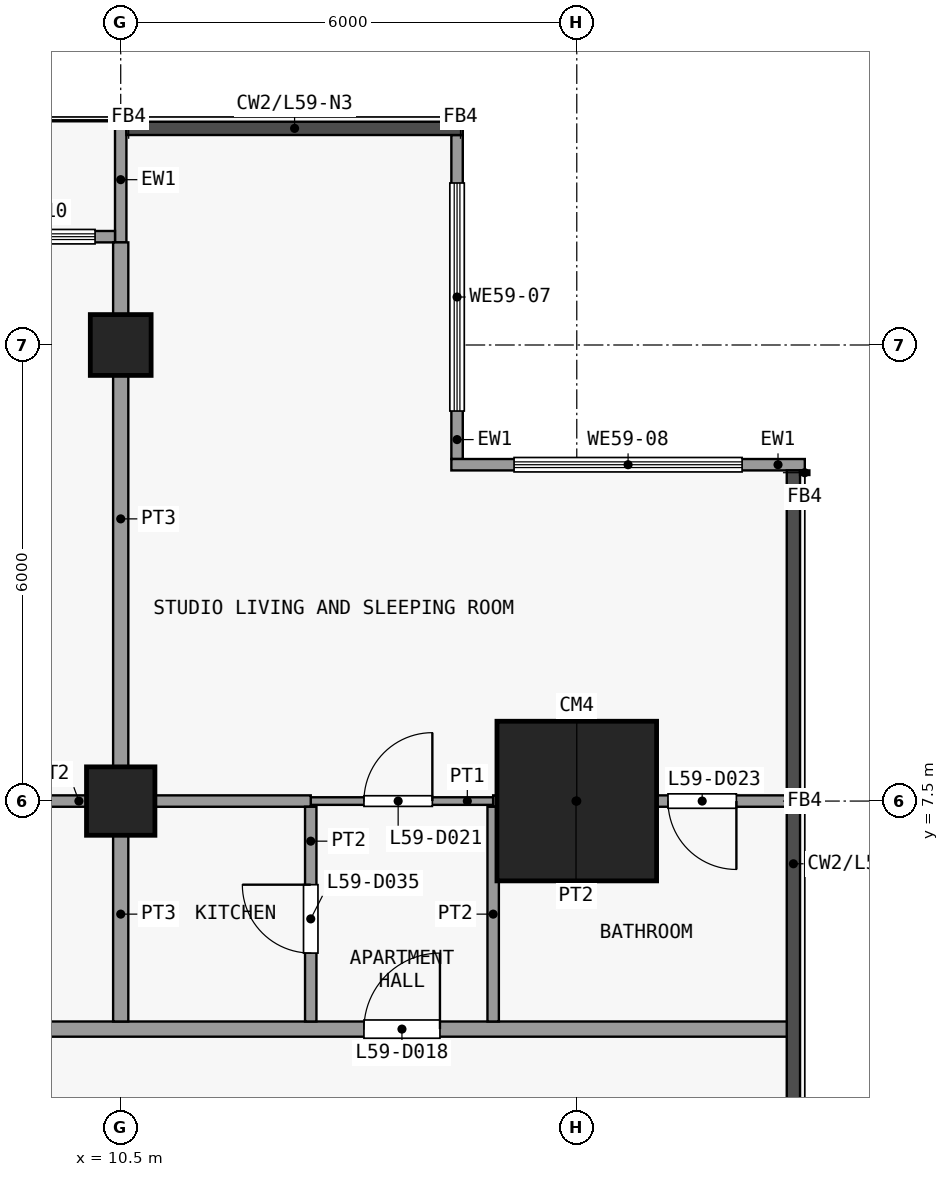
"""IFC4 building model, lengths in metres.
Left out: names, types, materials, properties, quantities, classifications, styles, units other than length and angle.
Written with IfcOpenShell. Run it as: python <this file> out.ifc"""

import sys

from ifc_helpers import new_model, si_unit, direction, frame, frame_2d, origin, origin_2d, place, context, subcontext, project, spatial, rectangle, extrude, element, fill, save


model = new_model("IFC4")
c1 = context("Model", 3, precision=1e-05, world=origin(), true_north=direction((0.0, 1.0)))
c2 = subcontext(c1, "Body", "Model", "MODEL_VIEW")
j1 = project(units=[si_unit("LENGTHUNIT", "METRE"), si_unit("PLANEANGLEUNIT", "RADIAN")], contexts=[c1])
p1 = place(None, origin())
s1 = spatial("IfcSite", under=j1, at=p1, CompositionType="ELEMENT")
p2 = place(p1, origin())
s2 = spatial("IfcBuilding", under=s1, at=p2, CompositionType="ELEMENT")
p3 = place(p2, frame((0.0, 0.0, 233.9)))
s3 = spatial("IfcBuildingStorey", under=s2, at=p3, CompositionType="ELEMENT", Elevation=233.9)
p4 = place(p3, frame((10.5, 7.5, 0.0), z_axis=(0.0, 0.0, 1.0), x_axis=(1.0, 0.0, 0.0)))
e1 = element("IfcColumn", 1, at=p4, inside=s3, PredefinedType="COLUMN", context=c2, shape_type="SweptSolid", body=[
    extrude(rectangle(XDim=0.9, YDim=0.9, at=origin_2d()), origin(), (0.0, 0.0, 1.0), 3.6),
])
p5 = place(p3, frame((10.5, 13.5, 0.0), z_axis=(0.0, 0.0, 1.0), x_axis=(1.0, 0.0, 0.0)))
e2 = element("IfcColumn", 2, at=p5, inside=s3, PredefinedType="COLUMN", context=c2, shape_type="SweptSolid", body=[
    extrude(rectangle(XDim=0.8, YDim=0.8, at=origin_2d()), origin(), (0.0, 0.0, 1.0), 3.6),
])
p6 = place(p3, frame((16.5, 7.5, 0.0), z_axis=(0.0, 0.0, 1.0), x_axis=(1.0, 0.0, 0.0)))
e3 = element("IfcColumn", 3, at=p6, inside=s3, PredefinedType="COLUMN", context=c2, shape_type="SweptSolid", body=[
    extrude(rectangle(XDim=2.1, YDim=2.1, at=origin_2d()), origin(), (0.0, 0.0, 1.0), 3.6),
])
p7 = place(p3, frame((14.925, 16.262, 0.0), z_axis=(0.0, 0.0, 1.0), x_axis=(0.0, -1.0, 0.0)))
e4 = element("IfcWall", 4, at=p7, inside=s3, PredefinedType="SOLIDWALL", context=c2, shape_type="SweptSolid", body=[
    extrude(rectangle(XDim=4.262, YDim=0.15, at=frame_2d((2.131, 0.0))), origin(), (0.0, 0.0, 1.0), 3.3),
])
p8 = place(p7, frame((0.631, 0.0, 0.9)))
e5 = element("IfcOpeningElement", 5, at=p8, cuts=e4, PredefinedType="OPENING", context=c2, shape_type="SweptSolid", body=[
    extrude(rectangle(XDim=3.0, YDim=2.4, at=frame_2d((1.5, 1.2))), frame((0.0, 0.085, 0.0), z_axis=(0.0, -1.0, 0.0), x_axis=(1.0, 0.0, 0.0)), (0.0, 0.0, 1.0), 0.17),
])
p9 = place(p3, frame((14.85, 11.925, 0.0), z_axis=(0.0, 0.0, 1.0), x_axis=(1.0, 0.0, 0.0)))
e6 = element("IfcWall", 6, at=p9, inside=s3, PredefinedType="SOLIDWALL", context=c2, shape_type="SweptSolid", body=[
    extrude(rectangle(XDim=4.65, YDim=0.15, at=frame_2d((2.325, 0.0))), origin(), (0.0, 0.0, 1.0), 3.3),
])
p10 = place(p9, frame((0.825, 0.0, 0.9)))
e7 = element("IfcOpeningElement", 7, at=p10, cuts=e6, PredefinedType="OPENING", context=c2, shape_type="SweptSolid", body=[
    extrude(rectangle(XDim=3.0, YDim=2.4, at=frame_2d((1.5, 1.2))), frame((0.0, 0.085, 0.0), z_axis=(0.0, -1.0, 0.0), x_axis=(1.0, 0.0, 0.0)), (0.0, 0.0, 1.0), 0.17),
])
p11 = place(p3, frame((10.5, 14.85, 0.0), z_axis=(0.0, 0.0, 1.0), x_axis=(0.0, 1.0, 0.0)))
e8 = element("IfcWall", 8, at=p11, inside=s3, PredefinedType="SOLIDWALL", context=c2, shape_type="SweptSolid", body=[
    extrude(rectangle(XDim=1.65, YDim=0.15, at=frame_2d((0.825, 0.0))), origin(), (0.0, 0.0, 1.0), 3.3),
])
p12 = place(p3, frame((4.575, 14.925, 0.0), z_axis=(0.0, 0.0, 1.0), x_axis=(1.0, 0.0, 0.0)))
e9 = element("IfcWall", 9, at=p12, inside=s3, PredefinedType="SOLIDWALL", context=c2, shape_type="SweptSolid", body=[
    extrude(rectangle(XDim=5.85, YDim=0.15, at=frame_2d((2.925, 0.0))), origin(), (0.0, 0.0, 1.0), 3.3),
])
p13 = place(p12, frame((2.325, 0.0, 0.0)))
e10 = element("IfcOpeningElement", 10, at=p13, cuts=e9, PredefinedType="OPENING", context=c2, shape_type="SweptSolid", body=[
    extrude(rectangle(XDim=1.2, YDim=2.4, at=frame_2d((0.6, 1.2))), frame((0.0, 0.085, 0.0), z_axis=(0.0, -1.0, 0.0), x_axis=(1.0, 0.0, 0.0)), (0.0, 0.0, 1.0), 0.17),
])
p14 = place(p12, frame((0.262, 0.0, 0.9)))
e11 = element("IfcOpeningElement", 11, at=p14, cuts=e9, PredefinedType="OPENING", context=c2, shape_type="SweptSolid", body=[
    extrude(rectangle(XDim=1.8, YDim=2.1, at=frame_2d((0.9, 1.05))), frame((0.0, 0.085, 0.0), z_axis=(0.0, -1.0, 0.0), x_axis=(1.0, 0.0, 0.0)), (0.0, 0.0, 1.0), 0.17),
])
p15 = place(p12, frame((3.788, 0.0, 0.9)))
e12 = element("IfcOpeningElement", 12, at=p15, cuts=e9, PredefinedType="OPENING", context=c2, shape_type="SweptSolid", body=[
    extrude(rectangle(XDim=1.8, YDim=2.1, at=frame_2d((0.9, 1.05))), frame((0.0, 0.085, 0.0), z_axis=(0.0, -1.0, 0.0), x_axis=(1.0, 0.0, 0.0)), (0.0, 0.0, 1.0), 0.17),
])
p16 = place(p3, frame((-20.25, 4.5, 0.0), z_axis=(0.0, 0.0, 1.0), x_axis=(1.0, 0.0, 0.0)))
e13 = element("IfcWall", 13, at=p16, inside=s3, PredefinedType="PARTITIONING", context=c2, shape_type="SweptSolid", body=[
    extrude(rectangle(XDim=39.6, YDim=0.2, at=frame_2d((19.8, 0.0))), origin(), (0.0, 0.0, 1.0), 3.3),
])
p17 = place(p16, frame((7.95, 0.0, 0.0)))
e14 = element("IfcOpeningElement", 14, at=p17, cuts=e13, PredefinedType="OPENING", context=c2, shape_type="SweptSolid", body=[
    extrude(rectangle(XDim=1.0, YDim=2.1, at=frame_2d((0.5, 1.05))), frame((0.0, 0.11, 0.0), z_axis=(0.0, -1.0, 0.0), x_axis=(1.0, 0.0, 0.0)), (0.0, 0.0, 1.0), 0.22),
])
p18 = place(p16, frame((25.45, 0.0, 0.0)))
e15 = element("IfcOpeningElement", 15, at=p18, cuts=e13, PredefinedType="OPENING", context=c2, shape_type="SweptSolid", body=[
    extrude(rectangle(XDim=1.0, YDim=2.1, at=frame_2d((0.5, 1.05))), frame((0.0, 0.11, 0.0), z_axis=(0.0, -1.0, 0.0), x_axis=(1.0, 0.0, 0.0)), (0.0, 0.0, 1.0), 0.22),
])
p19 = place(p16, frame((33.95, 0.0, 0.0)))
e16 = element("IfcOpeningElement", 16, at=p19, cuts=e13, PredefinedType="OPENING", context=c2, shape_type="SweptSolid", body=[
    extrude(rectangle(XDim=1.0, YDim=2.1, at=frame_2d((0.5, 1.05))), frame((0.0, 0.11, 0.0), z_axis=(0.0, -1.0, 0.0), x_axis=(1.0, 0.0, 0.0)), (0.0, 0.0, 1.0), 0.22),
])
p20 = place(p3, frame((13.0, 7.5, 0.0), z_axis=(0.0, 0.0, 1.0), x_axis=(1.0, 0.0, 0.0)))
e17 = element("IfcWall", 17, at=p20, inside=s3, PredefinedType="PARTITIONING", context=c2, shape_type="SweptSolid", body=[
    extrude(rectangle(XDim=2.4, YDim=0.1, at=frame_2d((1.2, 0.0))), origin(), (0.0, 0.0, 1.0), 3.3),
])
p21 = place(p20, frame((0.7, 0.0, 0.0)))
e18 = element("IfcOpeningElement", 18, at=p21, cuts=e17, PredefinedType="OPENING", context=c2, shape_type="SweptSolid", body=[
    extrude(rectangle(XDim=0.9, YDim=2.1, at=frame_2d((0.45, 1.05))), frame((0.0, 0.06, 0.0), z_axis=(0.0, -1.0, 0.0), x_axis=(1.0, 0.0, 0.0)), (0.0, 0.0, 1.0), 0.12),
])
p22 = place(p3, frame((6.9, 7.5, 0.0), z_axis=(0.0, 0.0, 1.0), x_axis=(1.0, 0.0, 0.0)))
e19 = element("IfcWall", 19, at=p22, inside=s3, PredefinedType="PARTITIONING", context=c2, shape_type="SweptSolid", body=[
    extrude(rectangle(XDim=6.1, YDim=0.15, at=frame_2d((3.05, 0.0))), origin(), (0.0, 0.0, 1.0), 3.3),
])
p23 = place(p3, frame((15.4, 7.5, 0.0), z_axis=(0.0, 0.0, 1.0), x_axis=(1.0, 0.0, 0.0)))
e20 = element("IfcWall", 20, at=p23, inside=s3, PredefinedType="PARTITIONING", context=c2, shape_type="SweptSolid", body=[
    extrude(rectangle(XDim=3.863, YDim=0.15, at=frame_2d((1.931, 0.0))), origin(), (0.0, 0.0, 1.0), 3.3),
])
p24 = place(p23, frame((2.3, 0.0, 0.0)))
e21 = element("IfcOpeningElement", 21, at=p24, cuts=e20, PredefinedType="OPENING", context=c2, shape_type="SweptSolid", body=[
    extrude(rectangle(XDim=0.9, YDim=2.1, at=frame_2d((0.45, 1.05))), frame((0.0, 0.085, 0.0), z_axis=(0.0, -1.0, 0.0), x_axis=(1.0, 0.0, 0.0)), (0.0, 0.0, 1.0), 0.17),
])
p25 = place(p3, frame((10.5, 4.6, 0.0), z_axis=(0.0, 0.0, 1.0), x_axis=(0.0, 1.0, 0.0)))
e22 = element("IfcWall", 22, at=p25, inside=s3, PredefinedType="PARTITIONING", context=c2, shape_type="SweptSolid", body=[
    extrude(rectangle(XDim=2.825, YDim=0.2, at=frame_2d((1.413, 0.0))), origin(), (0.0, 0.0, 1.0), 3.3),
])
p26 = place(p3, frame((10.5, 7.575, 0.0), z_axis=(0.0, 0.0, 1.0), x_axis=(0.0, 1.0, 0.0)))
e23 = element("IfcWall", 23, at=p26, inside=s3, PredefinedType="PARTITIONING", context=c2, shape_type="SweptSolid", body=[
    extrude(rectangle(XDim=7.275, YDim=0.2, at=frame_2d((3.638, 0.0))), origin(), (0.0, 0.0, 1.0), 3.3),
])
p27 = place(p3, frame((13.0, 4.6, 0.0), z_axis=(0.0, 0.0, 1.0), x_axis=(0.0, 1.0, 0.0)))
e24 = element("IfcWall", 24, at=p27, inside=s3, PredefinedType="PARTITIONING", context=c2, shape_type="SweptSolid", body=[
    extrude(rectangle(XDim=2.825, YDim=0.15, at=frame_2d((1.413, 0.0))), origin(), (0.0, 0.0, 1.0), 3.3),
])
p28 = place(p27, frame((0.9, 0.0, 0.0)))
e25 = element("IfcOpeningElement", 25, at=p28, cuts=e24, PredefinedType="OPENING", context=c2, shape_type="SweptSolid", body=[
    extrude(rectangle(XDim=0.9, YDim=2.1, at=frame_2d((0.45, 1.05))), frame((0.0, 0.085, 0.0), z_axis=(0.0, -1.0, 0.0), x_axis=(1.0, 0.0, 0.0)), (0.0, 0.0, 1.0), 0.17),
])
p29 = place(p3, frame((15.4, 4.6, 0.0), z_axis=(0.0, 0.0, 1.0), x_axis=(0.0, 1.0, 0.0)))
e26 = element("IfcWall", 26, at=p29, inside=s3, PredefinedType="PARTITIONING", context=c2, shape_type="SweptSolid", body=[
    extrude(rectangle(XDim=2.825, YDim=0.15, at=frame_2d((1.413, 0.0))), origin(), (0.0, 0.0, 1.0), 3.3),
])
p30 = place(p8, origin())
e27 = element("IfcWindow", 27, at=p30, inside=s3, PartitioningType="SINGLE_PANEL", PredefinedType="WINDOW", context=c2, shape_type="SweptSolid", body=[
    extrude(rectangle(XDim=3.0, YDim=2.4, at=frame_2d((1.5, 1.2))), frame((0.0, 0.03, 0.0), z_axis=(0.0, -1.0, 0.0), x_axis=(1.0, 0.0, 0.0)), (0.0, 0.0, 1.0), 0.06),
])
fill(e5, e27)
p31 = place(p10, origin())
e28 = element("IfcWindow", 28, at=p31, inside=s3, PartitioningType="SINGLE_PANEL", PredefinedType="WINDOW", context=c2, shape_type="SweptSolid", body=[
    extrude(rectangle(XDim=3.0, YDim=2.4, at=frame_2d((1.5, 1.2))), frame((0.0, 0.03, 0.0), z_axis=(0.0, -1.0, 0.0), x_axis=(1.0, 0.0, 0.0)), (0.0, 0.0, 1.0), 0.06),
])
fill(e7, e28)
p32 = place(p15, origin())
e29 = element("IfcWindow", 29, at=p32, inside=s3, PartitioningType="SINGLE_PANEL", PredefinedType="WINDOW", context=c2, shape_type="SweptSolid", body=[
    extrude(rectangle(XDim=1.8, YDim=2.1, at=frame_2d((0.9, 1.05))), frame((0.0, 0.03, 0.0), z_axis=(0.0, -1.0, 0.0), x_axis=(1.0, 0.0, 0.0)), (0.0, 0.0, 1.0), 0.06),
])
fill(e12, e29)
p33 = place(p19, origin())
e30 = element("IfcDoor", 30, at=p33, inside=s3, OperationType="SINGLE_SWING_LEFT", PredefinedType="DOOR", context=c2, shape_type="SweptSolid", body=[
    extrude(rectangle(XDim=1.0, YDim=2.1, at=frame_2d((0.5, 1.05))), frame((0.0, 0.025, 0.0), z_axis=(0.0, -1.0, 0.0), x_axis=(1.0, 0.0, 0.0)), (0.0, 0.0, 1.0), 0.05),
])
fill(e16, e30)
p34 = place(p21, origin())
e31 = element("IfcDoor", 31, at=p34, inside=s3, OperationType="SINGLE_SWING_LEFT", PredefinedType="DOOR", context=c2, shape_type="SweptSolid", body=[
    extrude(rectangle(XDim=0.9, YDim=2.1, at=frame_2d((0.45, 1.05))), frame((0.0, 0.025, 0.0), z_axis=(0.0, -1.0, 0.0), x_axis=(1.0, 0.0, 0.0)), (0.0, 0.0, 1.0), 0.05),
])
fill(e18, e31)
p35 = place(p24, origin())
e32 = element("IfcDoor", 32, at=p35, inside=s3, OperationType="SINGLE_SWING_RIGHT", PredefinedType="DOOR", context=c2, shape_type="SweptSolid", body=[
    extrude(rectangle(XDim=0.9, YDim=2.1, at=frame_2d((0.45, 1.05))), frame((0.0, 0.025, 0.0), z_axis=(0.0, -1.0, 0.0), x_axis=(1.0, 0.0, 0.0)), (0.0, 0.0, 1.0), 0.05),
])
fill(e21, e32)
p36 = place(p28, origin())
e33 = element("IfcDoor", 33, at=p36, inside=s3, OperationType="SINGLE_SWING_LEFT", PredefinedType="DOOR", context=c2, shape_type="SweptSolid", body=[
    extrude(rectangle(XDim=0.9, YDim=2.1, at=frame_2d((0.45, 1.05))), frame((0.0, 0.025, 0.0), z_axis=(0.0, -1.0, 0.0), x_axis=(1.0, 0.0, 0.0)), (0.0, 0.0, 1.0), 0.05),
])
fill(e25, e33)
save(model, sys.argv[1])
